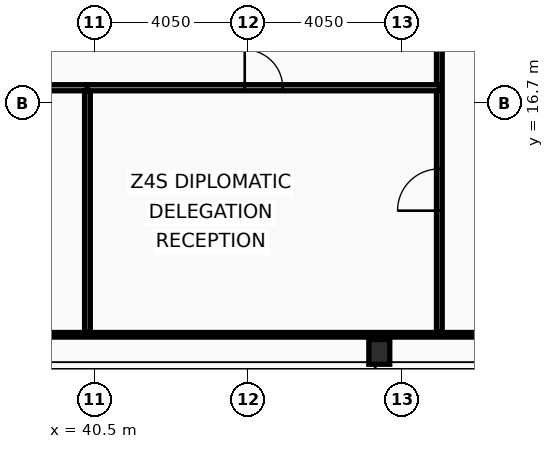
"""IFC4 building model, lengths in metres.
Left out: names, types, materials, properties, quantities, classifications, styles, units other than length and angle.
Written with IfcOpenShell. Run it as: python <this file> out.ifc"""

import sys

from ifc_helpers import new_model, si_unit, direction, frame, frame_2d, origin, origin_2d, place, context, subcontext, project, spatial, rectangle, hollow_rectangle, extrude, element, fill, save


model = new_model("IFC4")
c1 = context("Model", 3, precision=1e-05, world=origin(), true_north=direction((0.0, 1.0)))
c2 = subcontext(c1, "Body", "Model", "MODEL_VIEW")
j1 = project(units=[si_unit("LENGTHUNIT", "METRE"), si_unit("PLANEANGLEUNIT", "RADIAN")], contexts=[c1])
p1 = place(None, origin())
s1 = spatial("IfcSite", under=j1, at=p1, CompositionType="ELEMENT")
p2 = place(p1, origin())
s2 = spatial("IfcBuilding", under=s1, at=p2, CompositionType="ELEMENT")
p3 = place(p2, frame((0.0, 0.0, 314.6)))
s3 = spatial("IfcBuildingStorey", under=s2, at=p3, CompositionType="ELEMENT", Elevation=314.6)
p4 = place(p3, frame((48.0, 10.15, 0.0), z_axis=(0.0, 0.0, 1.0), x_axis=(1.0, 0.0, 0.0)))
e1 = element("IfcColumn", 1, at=p4, inside=s3, PredefinedType="COLUMN", context=c2, shape_type="SweptSolid", body=[
    extrude(hollow_rectangle(XDim=0.55, YDim=0.65, WallThickness=0.04, at=origin_2d()), origin(), (0.0, 0.0, 1.0), 3.6),
])
p5 = place(p3, frame((49.58, 10.665, 0.0), z_axis=(0.0, 0.0, 1.0), x_axis=(0.0, 1.0, 0.0)))
e2 = element("IfcWall", 2, at=p5, inside=s3, PredefinedType="PARTITIONING", context=c2, shape_type="SweptSolid", body=[
    extrude(rectangle(XDim=24.955, YDim=0.15, at=frame_2d((12.478, 0.0))), origin(), (0.0, 0.0, 1.0), 3.07),
])
p6 = place(p5, frame((3.2, 0.0, 0.0)))
e3 = element("IfcOpeningElement", 3, at=p6, cuts=e2, PredefinedType="OPENING", context=c2, shape_type="SweptSolid", body=[
    extrude(rectangle(XDim=1.1, YDim=2.1, at=frame_2d((0.55, 1.05))), frame((0.0, 0.085, 0.0), z_axis=(0.0, -1.0, 0.0), x_axis=(1.0, 0.0, 0.0)), (0.0, 0.0, 1.0), 0.17),
])
p7 = place(p3, frame((29.903, 17.1, 0.0), z_axis=(0.0, 0.0, 1.0), x_axis=(1.0, 0.0, 0.0)))
e4 = element("IfcWall", 4, at=p7, inside=s3, PredefinedType="PARTITIONING", context=c2, shape_type="SweptSolid", body=[
    extrude(rectangle(XDim=10.417, YDim=0.16, at=frame_2d((5.209, 0.0))), origin(), (0.0, 0.0, 1.0), 3.44),
])
p8 = place(p7, frame((4.625, 0.0, 0.0)))
e5 = element("IfcOpeningElement", 5, at=p8, cuts=e4, PredefinedType="OPENING", context=c2, shape_type="SweptSolid", body=[
    extrude(rectangle(XDim=1.0, YDim=2.05, at=frame_2d((0.5, 1.025))), frame((0.0, 0.09, 0.0), z_axis=(0.0, -1.0, 0.0), x_axis=(1.0, 0.0, 0.0)), (0.0, 0.0, 1.0), 0.18),
])
p9 = place(p3, frame((40.32, 17.1, 0.0), z_axis=(0.0, 0.0, 1.0), x_axis=(1.0, 0.0, 0.0)))
e6 = element("IfcWall", 6, at=p9, inside=s3, PredefinedType="PARTITIONING", context=c2, shape_type="SweptSolid", body=[
    extrude(rectangle(XDim=9.26, YDim=0.16, at=frame_2d((4.63, 0.0))), origin(), (0.0, 0.0, 1.0), 2.83),
])
p10 = place(p9, frame((4.139, 0.0, 0.0)))
e7 = element("IfcOpeningElement", 7, at=p10, cuts=e6, PredefinedType="OPENING", context=c2, shape_type="SweptSolid", body=[
    extrude(rectangle(XDim=1.0, YDim=2.05, at=frame_2d((0.5, 1.025))), frame((0.0, 0.09, 0.0), z_axis=(0.0, -1.0, 0.0), x_axis=(1.0, 0.0, 0.0)), (0.0, 0.0, 1.0), 0.18),
])
p11 = place(p3, frame((40.32, 10.665, 0.0), z_axis=(0.0, 0.0, 1.0), x_axis=(0.0, 1.0, 0.0)))
e8 = element("IfcWall", 8, at=p11, inside=s3, PredefinedType="PARTITIONING", context=c2, shape_type="SweptSolid", body=[
    extrude(rectangle(XDim=6.35, YDim=0.15, at=frame_2d((3.175, 0.0))), origin(), (0.0, 0.0, 1.0), 3.07),
])
p12 = place(p3, frame((12.095, 10.6, 0.0), z_axis=(0.0, 0.0, 1.0), x_axis=(1.0, 0.0, 0.0)))
e9 = element("IfcWall", 9, at=p12, inside=s3, PredefinedType="PARTITIONING", context=c2, shape_type="SweptSolid", body=[
    extrude(rectangle(XDim=48.71, YDim=0.12, at=frame_2d((24.355, 0.0))), origin(), (0.0, 0.0, 1.0), 2.83),
])
p13 = place(p6, origin())
e10 = element("IfcDoor", 10, at=p13, inside=s3, OperationType="SINGLE_SWING_LEFT", PredefinedType="DOOR", context=c2, shape_type="SweptSolid", body=[
    extrude(rectangle(XDim=1.1, YDim=2.1, at=frame_2d((0.55, 1.05))), frame((0.0, 0.025, 0.0), z_axis=(0.0, -1.0, 0.0), x_axis=(1.0, 0.0, 0.0)), (0.0, 0.0, 1.0), 0.05),
])
fill(e3, e10)
p14 = place(p10, origin())
e11 = element("IfcDoor", 11, at=p14, inside=s3, OperationType="SINGLE_SWING_LEFT", PredefinedType="DOOR", context=c2, shape_type="SweptSolid", body=[
    extrude(rectangle(XDim=1.0, YDim=2.05, at=frame_2d((0.5, 1.025))), frame((0.0, 0.025, 0.0), z_axis=(0.0, -1.0, 0.0), x_axis=(1.0, 0.0, 0.0)), (0.0, 0.0, 1.0), 0.05),
])
fill(e7, e11)
save(model, sys.argv[1])
